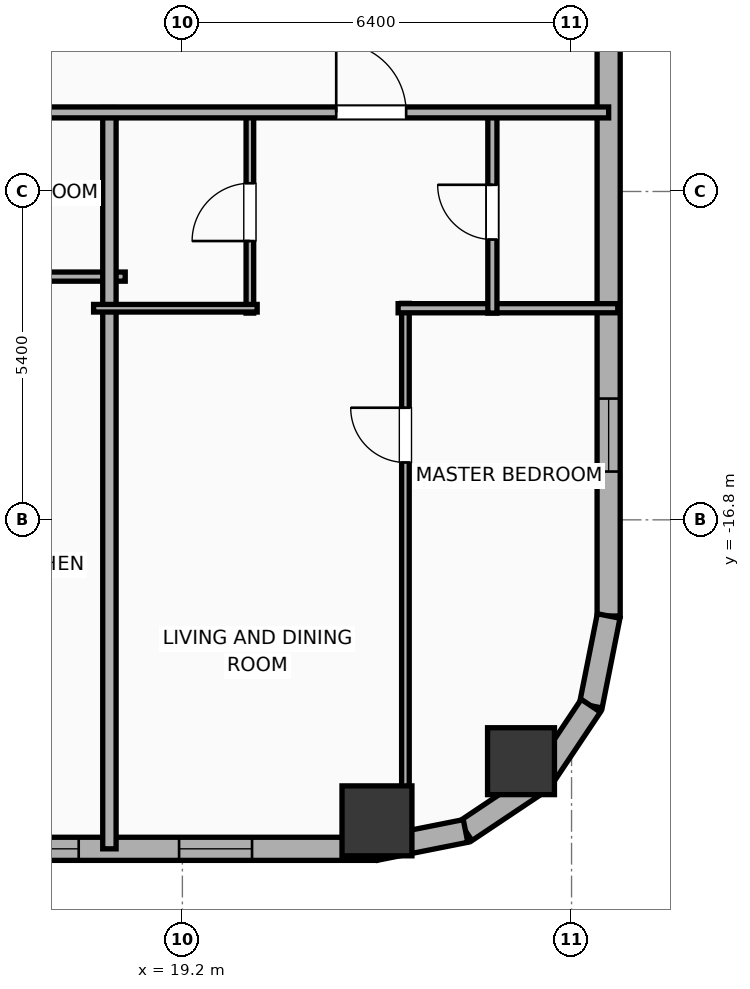
"""IFC4 building model, lengths in metres.
Left out: names, types, materials, properties, quantities, classifications, styles, units other than length and angle.
Written with IfcOpenShell. Run it as: python <this file> out.ifc"""

import sys

from ifc_helpers import new_model, si_unit, direction, frame, frame_2d, origin, origin_2d, place, context, subcontext, project, spatial, rectangle, hollow_rectangle, hollow_circle, extrude, element, fill, save


model = new_model("IFC4")
c1 = context("Model", 3, precision=1e-05, world=origin(), true_north=direction((0.0, 1.0)))
c2 = subcontext(c1, "Body", "Model", "MODEL_VIEW")
j1 = project(units=[si_unit("LENGTHUNIT", "METRE"), si_unit("PLANEANGLEUNIT", "RADIAN")], contexts=[c1])
p1 = place(None, origin())
s1 = spatial("IfcSite", under=j1, at=p1, CompositionType="ELEMENT")
p2 = place(p1, origin())
s2 = spatial("IfcBuilding", under=s1, at=p2, CompositionType="ELEMENT")
p3 = place(p2, frame((0.0, 0.0, 33.8)))
s3 = spatial("IfcBuildingStorey", under=s2, at=p3, CompositionType="ELEMENT", Elevation=33.8)
p4 = place(p3, frame((22.4, -21.75, 0.0), z_axis=(0.0, 0.0, 1.0), x_axis=(1.0, 0.0, 0.0)))
e1 = element("IfcColumn", 1, at=p4, inside=s3, PredefinedType="COLUMN", context=c2, shape_type="SweptSolid", body=[
    extrude(hollow_rectangle(XDim=1.15, YDim=1.15, WallThickness=0.04, at=origin_2d()), origin(), (0.0, 0.0, 1.0), 3.9),
])
p5 = place(p3, frame((24.769, -20.769, 0.0), z_axis=(0.0, 0.0, 1.0), x_axis=(1.0, 0.0, 0.0)))
e2 = element("IfcColumn", 2, at=p5, inside=s3, PredefinedType="COLUMN", context=c2, shape_type="SweptSolid", body=[
    extrude(hollow_circle(Radius=0.55, WallThickness=0.036, at=origin_2d()), origin(), (0.0, 0.0, 1.0), 3.9),
])
p6 = place(p3, frame((22.381, -22.21, 0.0), z_axis=(0.0, 0.0, 1.0), x_axis=(-1.0, 0.0, 0.0)))
e3 = element("IfcWall", 3, at=p6, inside=s3, PredefinedType="ELEMENTEDWALL", context=c2, shape_type="SweptSolid", body=[
    extrude(rectangle(XDim=51.963, YDim=0.38, at=frame_2d((25.981, 0.0))), origin(), (0.0, 0.0, 1.0), 3.65),
])
p7 = place(p6, frame((49.127, 0.0, 0.75)))
e4 = element("IfcOpeningElement", 4, at=p7, cuts=e3, PredefinedType="OPENING", context=c2, shape_type="SweptSolid", body=[
    extrude(rectangle(XDim=1.2, YDim=2.05, at=frame_2d((0.6, 1.025))), frame((0.0, 0.2, 0.0), z_axis=(0.0, -1.0, 0.0), x_axis=(1.0, 0.0, 0.0)), (0.0, 0.0, 1.0), 0.4),
])
p8 = place(p6, frame((43.926, 0.0, 0.75)))
e5 = element("IfcOpeningElement", 5, at=p8, cuts=e3, PredefinedType="OPENING", context=c2, shape_type="SweptSolid", body=[
    extrude(rectangle(XDim=1.2, YDim=2.05, at=frame_2d((0.6, 1.025))), frame((0.0, 0.2, 0.0), z_axis=(0.0, -1.0, 0.0), x_axis=(1.0, 0.0, 0.0)), (0.0, 0.0, 1.0), 0.4),
])
p9 = place(p6, frame((46.676, 0.0, 0.75)))
e6 = element("IfcOpeningElement", 6, at=p9, cuts=e3, PredefinedType="OPENING", context=c2, shape_type="SweptSolid", body=[
    extrude(rectangle(XDim=1.2, YDim=2.05, at=frame_2d((0.6, 1.025))), frame((0.0, 0.2, 0.0), z_axis=(0.0, -1.0, 0.0), x_axis=(1.0, 0.0, 0.0)), (0.0, 0.0, 1.0), 0.4),
])
p10 = place(p6, frame((39.531, 0.0, 0.75)))
e7 = element("IfcOpeningElement", 7, at=p10, cuts=e3, PredefinedType="OPENING", context=c2, shape_type="SweptSolid", body=[
    extrude(rectangle(XDim=1.2, YDim=2.05, at=frame_2d((0.6, 1.025))), frame((0.0, 0.2, 0.0), z_axis=(0.0, -1.0, 0.0), x_axis=(1.0, 0.0, 0.0)), (0.0, 0.0, 1.0), 0.4),
])
p11 = place(p6, frame((32.926, 0.0, 0.75)))
e8 = element("IfcOpeningElement", 8, at=p11, cuts=e3, PredefinedType="OPENING", context=c2, shape_type="SweptSolid", body=[
    extrude(rectangle(XDim=1.2, YDim=2.05, at=frame_2d((0.6, 1.025))), frame((0.0, 0.2, 0.0), z_axis=(0.0, -1.0, 0.0), x_axis=(1.0, 0.0, 0.0)), (0.0, 0.0, 1.0), 0.4),
])
p12 = place(p6, frame((35.676, 0.0, 0.75)))
e9 = element("IfcOpeningElement", 9, at=p12, cuts=e3, PredefinedType="OPENING", context=c2, shape_type="SweptSolid", body=[
    extrude(rectangle(XDim=1.2, YDim=2.05, at=frame_2d((0.6, 1.025))), frame((0.0, 0.2, 0.0), z_axis=(0.0, -1.0, 0.0), x_axis=(1.0, 0.0, 0.0)), (0.0, 0.0, 1.0), 0.4),
])
p13 = place(p6, frame((28.531, 0.0, 0.75)))
e10 = element("IfcOpeningElement", 10, at=p13, cuts=e3, PredefinedType="OPENING", context=c2, shape_type="SweptSolid", body=[
    extrude(rectangle(XDim=1.2, YDim=2.05, at=frame_2d((0.6, 1.025))), frame((0.0, 0.2, 0.0), z_axis=(0.0, -1.0, 0.0), x_axis=(1.0, 0.0, 0.0)), (0.0, 0.0, 1.0), 0.4),
])
p14 = place(p6, frame((21.926, 0.0, 0.75)))
e11 = element("IfcOpeningElement", 11, at=p14, cuts=e3, PredefinedType="OPENING", context=c2, shape_type="SweptSolid", body=[
    extrude(rectangle(XDim=1.2, YDim=2.05, at=frame_2d((0.6, 1.025))), frame((0.0, 0.2, 0.0), z_axis=(0.0, -1.0, 0.0), x_axis=(1.0, 0.0, 0.0)), (0.0, 0.0, 1.0), 0.4),
])
p15 = place(p6, frame((24.676, 0.0, 0.75)))
e12 = element("IfcOpeningElement", 12, at=p15, cuts=e3, PredefinedType="OPENING", context=c2, shape_type="SweptSolid", body=[
    extrude(rectangle(XDim=1.2, YDim=2.05, at=frame_2d((0.6, 1.025))), frame((0.0, 0.2, 0.0), z_axis=(0.0, -1.0, 0.0), x_axis=(1.0, 0.0, 0.0)), (0.0, 0.0, 1.0), 0.4),
])
p16 = place(p6, frame((18.636, 0.0, 0.75)))
e13 = element("IfcOpeningElement", 13, at=p16, cuts=e3, PredefinedType="OPENING", context=c2, shape_type="SweptSolid", body=[
    extrude(rectangle(XDim=1.2, YDim=2.05, at=frame_2d((0.6, 1.025))), frame((0.0, 0.2, 0.0), z_axis=(0.0, -1.0, 0.0), x_axis=(1.0, 0.0, 0.0)), (0.0, 0.0, 1.0), 0.4),
])
p17 = place(p6, frame((15.886, 0.0, 0.75)))
e14 = element("IfcOpeningElement", 14, at=p17, cuts=e3, PredefinedType="OPENING", context=c2, shape_type="SweptSolid", body=[
    extrude(rectangle(XDim=1.2, YDim=2.05, at=frame_2d((0.6, 1.025))), frame((0.0, 0.2, 0.0), z_axis=(0.0, -1.0, 0.0), x_axis=(1.0, 0.0, 0.0)), (0.0, 0.0, 1.0), 0.4),
])
p18 = place(p6, frame((12.031, 0.0, 0.75)))
e15 = element("IfcOpeningElement", 15, at=p18, cuts=e3, PredefinedType="OPENING", context=c2, shape_type="SweptSolid", body=[
    extrude(rectangle(XDim=1.2, YDim=2.05, at=frame_2d((0.6, 1.025))), frame((0.0, 0.2, 0.0), z_axis=(0.0, -1.0, 0.0), x_axis=(1.0, 0.0, 0.0)), (0.0, 0.0, 1.0), 0.4),
])
p19 = place(p6, frame((7.636, 0.0, 0.75)))
e16 = element("IfcOpeningElement", 16, at=p19, cuts=e3, PredefinedType="OPENING", context=c2, shape_type="SweptSolid", body=[
    extrude(rectangle(XDim=1.2, YDim=2.05, at=frame_2d((0.6, 1.025))), frame((0.0, 0.2, 0.0), z_axis=(0.0, -1.0, 0.0), x_axis=(1.0, 0.0, 0.0)), (0.0, 0.0, 1.0), 0.4),
])
p20 = place(p6, frame((4.886, 0.0, 0.75)))
e17 = element("IfcOpeningElement", 17, at=p20, cuts=e3, PredefinedType="OPENING", context=c2, shape_type="SweptSolid", body=[
    extrude(rectangle(XDim=1.2, YDim=2.05, at=frame_2d((0.6, 1.025))), frame((0.0, 0.2, 0.0), z_axis=(0.0, -1.0, 0.0), x_axis=(1.0, 0.0, 0.0)), (0.0, 0.0, 1.0), 0.4),
])
p21 = place(p6, frame((2.036, 0.0, 0.75)))
e18 = element("IfcOpeningElement", 18, at=p21, cuts=e3, PredefinedType="OPENING", context=c2, shape_type="SweptSolid", body=[
    extrude(rectangle(XDim=1.2, YDim=2.05, at=frame_2d((0.6, 1.025))), frame((0.0, 0.2, 0.0), z_axis=(0.0, -1.0, 0.0), x_axis=(1.0, 0.0, 0.0)), (0.0, 0.0, 1.0), 0.4),
])
p22 = place(p3, frame((26.21, 18.381, 0.0), z_axis=(0.0, 0.0, 1.0), x_axis=(0.0, -1.0, 0.0)))
e19 = element("IfcWall", 19, at=p22, inside=s3, PredefinedType="ELEMENTEDWALL", context=c2, shape_type="SweptSolid", body=[
    extrude(rectangle(XDim=36.763, YDim=0.38, at=frame_2d((18.381, 0.0))), origin(), (0.0, 0.0, 1.0), 3.65),
])
p23 = place(p22, frame((33.187, 0.0, 0.75)))
e20 = element("IfcOpeningElement", 20, at=p23, cuts=e19, PredefinedType="OPENING", context=c2, shape_type="SweptSolid", body=[
    extrude(rectangle(XDim=1.2, YDim=2.05, at=frame_2d((0.6, 1.025))), frame((0.0, 0.2, 0.0), z_axis=(0.0, -1.0, 0.0), x_axis=(1.0, 0.0, 0.0)), (0.0, 0.0, 1.0), 0.4),
])
p24 = place(p3, frame((26.21, -18.381, 0.0), z_axis=(0.0, 0.0, 1.0), x_axis=(-0.195086038585, -0.980786132421, 0.0)))
e21 = element("IfcWall", 21, at=p24, inside=s3, PredefinedType="ELEMENTEDWALL", context=c2, shape_type="SweptSolid", body=[
    extrude(rectangle(XDim=1.504, YDim=0.38, at=frame_2d((0.752, 0.0))), origin(), (0.0, 0.0, 1.0), 3.65),
])
for number, where, z_axis, x_axis in (
    (22, (25.917, -19.857, 0.0), (0.0, 0.0, 1.0), (-0.556, -0.831, 0.0)),
    (23, (25.091, -21.091, 0.0), (0.0, 0.0, 1.0), (-0.831, -0.556, 0.0)),
):
    element("IfcWall", number, at=place(p3, frame(where, z_axis=z_axis, x_axis=x_axis)), inside=s3, PredefinedType="ELEMENTEDWALL", context=c2, shape_type="SweptSolid", body=[
        extrude(rectangle(XDim=1.485, YDim=0.38, at=frame_2d((0.743, 0.0))), origin(), (0.0, 0.0, 1.0), 3.65),
    ])
p25 = place(p3, frame((23.857, -21.917, 0.0), z_axis=(0.0, 0.0, 1.0), x_axis=(-0.980786132421, -0.195086038585, 0.0)))
e24 = element("IfcWall", 24, at=p25, inside=s3, PredefinedType="ELEMENTEDWALL", context=c2, shape_type="SweptSolid", body=[
    extrude(rectangle(XDim=1.504, YDim=0.38, at=frame_2d((0.752, 0.0))), origin(), (0.0, 0.0, 1.0), 3.65),
])
p26 = place(p3, frame((15.71, -12.8, 0.0), z_axis=(0.0, 0.0, 1.0), x_axis=(1.0, 0.0, 0.0)))
e25 = element("IfcWall", 25, at=p26, inside=s3, PredefinedType="PLUMBINGWALL", context=c2, shape_type="SweptSolid", body=[
    extrude(rectangle(XDim=2.55, YDim=0.15, at=frame_2d((1.275, 0.0))), origin(), (0.0, 0.0, 1.0), 3.65),
])
p27 = place(p3, frame((18.0, -22.21, 0.0), z_axis=(0.0, 0.0, 1.0), x_axis=(0.0, 1.0, 0.0)))
e26 = element("IfcWall", 26, at=p27, inside=s3, PredefinedType="PARTITIONING", context=c2, shape_type="SweptSolid", body=[
    extrude(rectangle(XDim=12.19, YDim=0.22, at=frame_2d((6.095, 0.0))), origin(), (0.0, 0.0, 1.0), 3.65),
])
p28 = place(p3, frame((22.868, -22.266, 0.0), z_axis=(0.0, 0.0, 1.0), x_axis=(0.0, 1.0, 0.0)))
e27 = element("IfcWall", 27, at=p28, inside=s3, PredefinedType="PARTITIONING", context=c2, shape_type="SweptSolid", body=[
    extrude(rectangle(XDim=9.026, YDim=0.125, at=frame_2d((4.513, 0.0))), origin(), (0.0, 0.0, 1.0), 3.65),
])
p29 = place(p28, frame((6.41, 0.0, 0.0)))
e28 = element("IfcOpeningElement", 28, at=p29, cuts=e27, PredefinedType="OPENING", context=c2, shape_type="SweptSolid", body=[
    extrude(rectangle(XDim=0.9, YDim=2.05, at=frame_2d((0.45, 1.025))), frame((0.0, 0.073, 0.0), z_axis=(0.0, -1.0, 0.0), x_axis=(1.0, 0.0, 0.0)), (0.0, 0.0, 1.0), 0.145),
])
p30 = place(p3, frame((22.748, -13.32, 0.0), z_axis=(0.0, 0.0, 1.0), x_axis=(1.0, 0.0, 0.0)))
e29 = element("IfcWall", 29, at=p30, inside=s3, PredefinedType="PLUMBINGWALL", context=c2, shape_type="SweptSolid", body=[
    extrude(rectangle(XDim=3.612, YDim=0.15, at=frame_2d((1.806, 0.0))), origin(), (0.0, 0.0, 1.0), 3.65),
])
p31 = place(p3, frame((20.31, -13.4, 0.0), z_axis=(0.0, 0.0, 1.0), x_axis=(0.0, 1.0, 0.0)))
e30 = element("IfcWall", 30, at=p31, inside=s3, PredefinedType="PARTITIONING", context=c2, shape_type="SweptSolid", body=[
    extrude(rectangle(XDim=3.32, YDim=0.125, at=frame_2d((1.66, 0.0))), origin(), (0.0, 0.0, 1.0), 2.94),
])
p32 = place(p31, frame((1.185, 0.0, 0.0)))
e31 = element("IfcOpeningElement", 31, at=p32, cuts=e30, PredefinedType="OPENING", context=c2, shape_type="SweptSolid", body=[
    extrude(rectangle(XDim=0.95, YDim=2.05, at=frame_2d((0.475, 1.025))), frame((0.0, 0.073, 0.0), z_axis=(0.0, -1.0, 0.0), x_axis=(1.0, 0.0, 0.0)), (0.0, 0.0, 1.0), 0.145),
])
p33 = place(p3, frame((17.74, -13.32, 0.0), z_axis=(0.0, 0.0, 1.0), x_axis=(1.0, 0.0, 0.0)))
e32 = element("IfcWall", 32, at=p33, inside=s3, PredefinedType="PARTITIONING", context=c2, shape_type="SweptSolid", body=[
    extrude(rectangle(XDim=2.69, YDim=0.125, at=frame_2d((1.345, 0.0))), origin(), (0.0, 0.0, 1.0), 3.65),
])
p34 = place(p3, frame((24.298, -13.4, 0.0), z_axis=(0.0, 0.0, 1.0), x_axis=(0.0, 1.0, 0.0)))
e33 = element("IfcWall", 33, at=p34, inside=s3, PredefinedType="PLUMBINGWALL", context=c2, shape_type="SweptSolid", body=[
    extrude(rectangle(XDim=3.32, YDim=0.15, at=frame_2d((1.66, 0.0))), origin(), (0.0, 0.0, 1.0), 3.65),
])
p35 = place(p34, frame((1.21, 0.0, 0.0)))
e34 = element("IfcOpeningElement", 34, at=p35, cuts=e33, PredefinedType="OPENING", context=c2, shape_type="SweptSolid", body=[
    extrude(rectangle(XDim=0.9, YDim=2.05, at=frame_2d((0.45, 1.025))), frame((0.0, 0.085, 0.0), z_axis=(0.0, -1.0, 0.0), x_axis=(1.0, 0.0, 0.0)), (0.0, 0.0, 1.0), 0.17),
])
p36 = place(p3, frame((-33.41, -10.1, 0.0), z_axis=(0.0, 0.0, 1.0), x_axis=(1.0, 0.0, 0.0)))
e35 = element("IfcWall", 35, at=p36, inside=s3, PredefinedType="PARTITIONING", context=c2, shape_type="SweptSolid", body=[
    extrude(rectangle(XDim=59.62, YDim=0.18, at=frame_2d((29.81, 0.0))), origin(), (0.0, 0.0, 1.0), 3.65),
])
p37 = place(p36, frame((3.259, 0.0, 0.0)))
e36 = element("IfcOpeningElement", 36, at=p37, cuts=e35, PredefinedType="OPENING", context=c2, shape_type="SweptSolid", body=[
    extrude(rectangle(XDim=1.15, YDim=2.05, at=frame_2d((0.575, 1.025))), frame((0.0, 0.1, 0.0), z_axis=(0.0, -1.0, 0.0), x_axis=(1.0, 0.0, 0.0)), (0.0, 0.0, 1.0), 0.2),
])
p38 = place(p36, frame((10.657, 0.0, 0.0)))
e37 = element("IfcOpeningElement", 37, at=p38, cuts=e35, PredefinedType="OPENING", context=c2, shape_type="SweptSolid", body=[
    extrude(rectangle(XDim=1.15, YDim=2.05, at=frame_2d((0.575, 1.025))), frame((0.0, 0.1, 0.0), z_axis=(0.0, -1.0, 0.0), x_axis=(1.0, 0.0, 0.0)), (0.0, 0.0, 1.0), 0.2),
])
p39 = place(p36, frame((15.421, 0.0, 0.0)))
e38 = element("IfcOpeningElement", 38, at=p39, cuts=e35, PredefinedType="OPENING", context=c2, shape_type="SweptSolid", body=[
    extrude(rectangle(XDim=0.9, YDim=2.05, at=frame_2d((0.45, 1.025))), frame((0.0, 0.1, 0.0), z_axis=(0.0, -1.0, 0.0), x_axis=(1.0, 0.0, 0.0)), (0.0, 0.0, 1.0), 0.2),
])
p40 = place(p36, frame((21.657, 0.0, 0.0)))
e39 = element("IfcOpeningElement", 39, at=p40, cuts=e35, PredefinedType="OPENING", context=c2, shape_type="SweptSolid", body=[
    extrude(rectangle(XDim=1.15, YDim=2.05, at=frame_2d((0.575, 1.025))), frame((0.0, 0.1, 0.0), z_axis=(0.0, -1.0, 0.0), x_axis=(1.0, 0.0, 0.0)), (0.0, 0.0, 1.0), 0.2),
])
p41 = place(p36, frame((26.421, 0.0, 0.0)))
e40 = element("IfcOpeningElement", 40, at=p41, cuts=e35, PredefinedType="OPENING", context=c2, shape_type="SweptSolid", body=[
    extrude(rectangle(XDim=0.9, YDim=2.05, at=frame_2d((0.45, 1.025))), frame((0.0, 0.1, 0.0), z_axis=(0.0, -1.0, 0.0), x_axis=(1.0, 0.0, 0.0)), (0.0, 0.0, 1.0), 0.2),
])
p42 = place(p36, frame((32.657, 0.0, 0.0)))
e41 = element("IfcOpeningElement", 41, at=p42, cuts=e35, PredefinedType="OPENING", context=c2, shape_type="SweptSolid", body=[
    extrude(rectangle(XDim=1.15, YDim=2.05, at=frame_2d((0.575, 1.025))), frame((0.0, 0.1, 0.0), z_axis=(0.0, -1.0, 0.0), x_axis=(1.0, 0.0, 0.0)), (0.0, 0.0, 1.0), 0.2),
])
p43 = place(p36, frame((36.008, 0.0, 0.0)))
e42 = element("IfcOpeningElement", 42, at=p43, cuts=e35, PredefinedType="OPENING", context=c2, shape_type="SweptSolid", body=[
    extrude(rectangle(XDim=1.15, YDim=2.05, at=frame_2d((0.575, 1.025))), frame((0.0, 0.1, 0.0), z_axis=(0.0, -1.0, 0.0), x_axis=(1.0, 0.0, 0.0)), (0.0, 0.0, 1.0), 0.2),
])
p44 = place(p36, frame((42.917, 0.0, 0.0)))
e43 = element("IfcOpeningElement", 43, at=p44, cuts=e35, PredefinedType="OPENING", context=c2, shape_type="SweptSolid", body=[
    extrude(rectangle(XDim=0.9, YDim=2.05, at=frame_2d((0.45, 1.025))), frame((0.0, 0.1, 0.0), z_axis=(0.0, -1.0, 0.0), x_axis=(1.0, 0.0, 0.0)), (0.0, 0.0, 1.0), 0.2),
])
p45 = place(p36, frame((47.008, 0.0, 0.0)))
e44 = element("IfcOpeningElement", 44, at=p45, cuts=e35, PredefinedType="OPENING", context=c2, shape_type="SweptSolid", body=[
    extrude(rectangle(XDim=1.15, YDim=2.05, at=frame_2d((0.575, 1.025))), frame((0.0, 0.1, 0.0), z_axis=(0.0, -1.0, 0.0), x_axis=(1.0, 0.0, 0.0)), (0.0, 0.0, 1.0), 0.2),
])
p46 = place(p36, frame((55.14, 0.0, 0.0)))
e45 = element("IfcOpeningElement", 45, at=p46, cuts=e35, PredefinedType="OPENING", context=c2, shape_type="SweptSolid", body=[
    extrude(rectangle(XDim=1.15, YDim=2.05, at=frame_2d((0.575, 1.025))), frame((0.0, 0.1, 0.0), z_axis=(0.0, -1.0, 0.0), x_axis=(1.0, 0.0, 0.0)), (0.0, 0.0, 1.0), 0.2),
])
p47 = place(p20, origin())
e46 = element("IfcWindow", 46, at=p47, inside=s3, PartitioningType="SINGLE_PANEL", PredefinedType="WINDOW", context=c2, shape_type="SweptSolid", body=[
    extrude(rectangle(XDim=1.2, YDim=2.05, at=frame_2d((0.6, 1.025))), frame((0.0, 0.03, 0.0), z_axis=(0.0, -1.0, 0.0), x_axis=(1.0, 0.0, 0.0)), (0.0, 0.0, 1.0), 0.06),
])
fill(e17, e46)
p48 = place(p21, origin())
e47 = element("IfcWindow", 47, at=p48, inside=s3, PartitioningType="SINGLE_PANEL", PredefinedType="WINDOW", context=c2, shape_type="SweptSolid", body=[
    extrude(rectangle(XDim=1.2, YDim=2.05, at=frame_2d((0.6, 1.025))), frame((0.0, 0.03, 0.0), z_axis=(0.0, -1.0, 0.0), x_axis=(1.0, 0.0, 0.0)), (0.0, 0.0, 1.0), 0.06),
])
fill(e18, e47)
p49 = place(p23, origin())
e48 = element("IfcWindow", 48, at=p49, inside=s3, PartitioningType="SINGLE_PANEL", PredefinedType="WINDOW", context=c2, shape_type="SweptSolid", body=[
    extrude(rectangle(XDim=1.2, YDim=2.05, at=frame_2d((0.6, 1.025))), frame((0.0, 0.03, 0.0), z_axis=(0.0, -1.0, 0.0), x_axis=(1.0, 0.0, 0.0)), (0.0, 0.0, 1.0), 0.06),
])
fill(e20, e48)
p50 = place(p29, origin())
e49 = element("IfcDoor", 49, at=p50, inside=s3, OperationType="SINGLE_SWING_RIGHT", PredefinedType="DOOR", context=c2, shape_type="SweptSolid", body=[
    extrude(rectangle(XDim=0.9, YDim=2.05, at=frame_2d((0.45, 1.025))), frame((0.0, 0.025, 0.0), z_axis=(0.0, -1.0, 0.0), x_axis=(1.0, 0.0, 0.0)), (0.0, 0.0, 1.0), 0.05),
])
fill(e28, e49)
p51 = place(p32, origin())
e50 = element("IfcDoor", 50, at=p51, inside=s3, OperationType="SINGLE_SWING_LEFT", PredefinedType="DOOR", context=c2, shape_type="SweptSolid", body=[
    extrude(rectangle(XDim=0.95, YDim=2.05, at=frame_2d((0.475, 1.025))), frame((0.0, 0.025, 0.0), z_axis=(0.0, -1.0, 0.0), x_axis=(1.0, 0.0, 0.0)), (0.0, 0.0, 1.0), 0.05),
])
fill(e31, e50)
p52 = place(p35, origin())
e51 = element("IfcDoor", 51, at=p52, inside=s3, OperationType="SINGLE_SWING_RIGHT", PredefinedType="DOOR", context=c2, shape_type="SweptSolid", body=[
    extrude(rectangle(XDim=0.9, YDim=2.05, at=frame_2d((0.45, 1.025))), frame((0.0, 0.025, 0.0), z_axis=(0.0, -1.0, 0.0), x_axis=(1.0, 0.0, 0.0)), (0.0, 0.0, 1.0), 0.05),
])
fill(e34, e51)
p53 = place(p46, origin())
e52 = element("IfcDoor", 52, at=p53, inside=s3, OperationType="SINGLE_SWING_LEFT", PredefinedType="DOOR", context=c2, shape_type="SweptSolid", body=[
    extrude(rectangle(XDim=1.15, YDim=2.05, at=frame_2d((0.575, 1.025))), frame((0.0, 0.025, 0.0), z_axis=(0.0, -1.0, 0.0), x_axis=(1.0, 0.0, 0.0)), (0.0, 0.0, 1.0), 0.05),
])
fill(e45, e52)
save(model, sys.argv[1])
